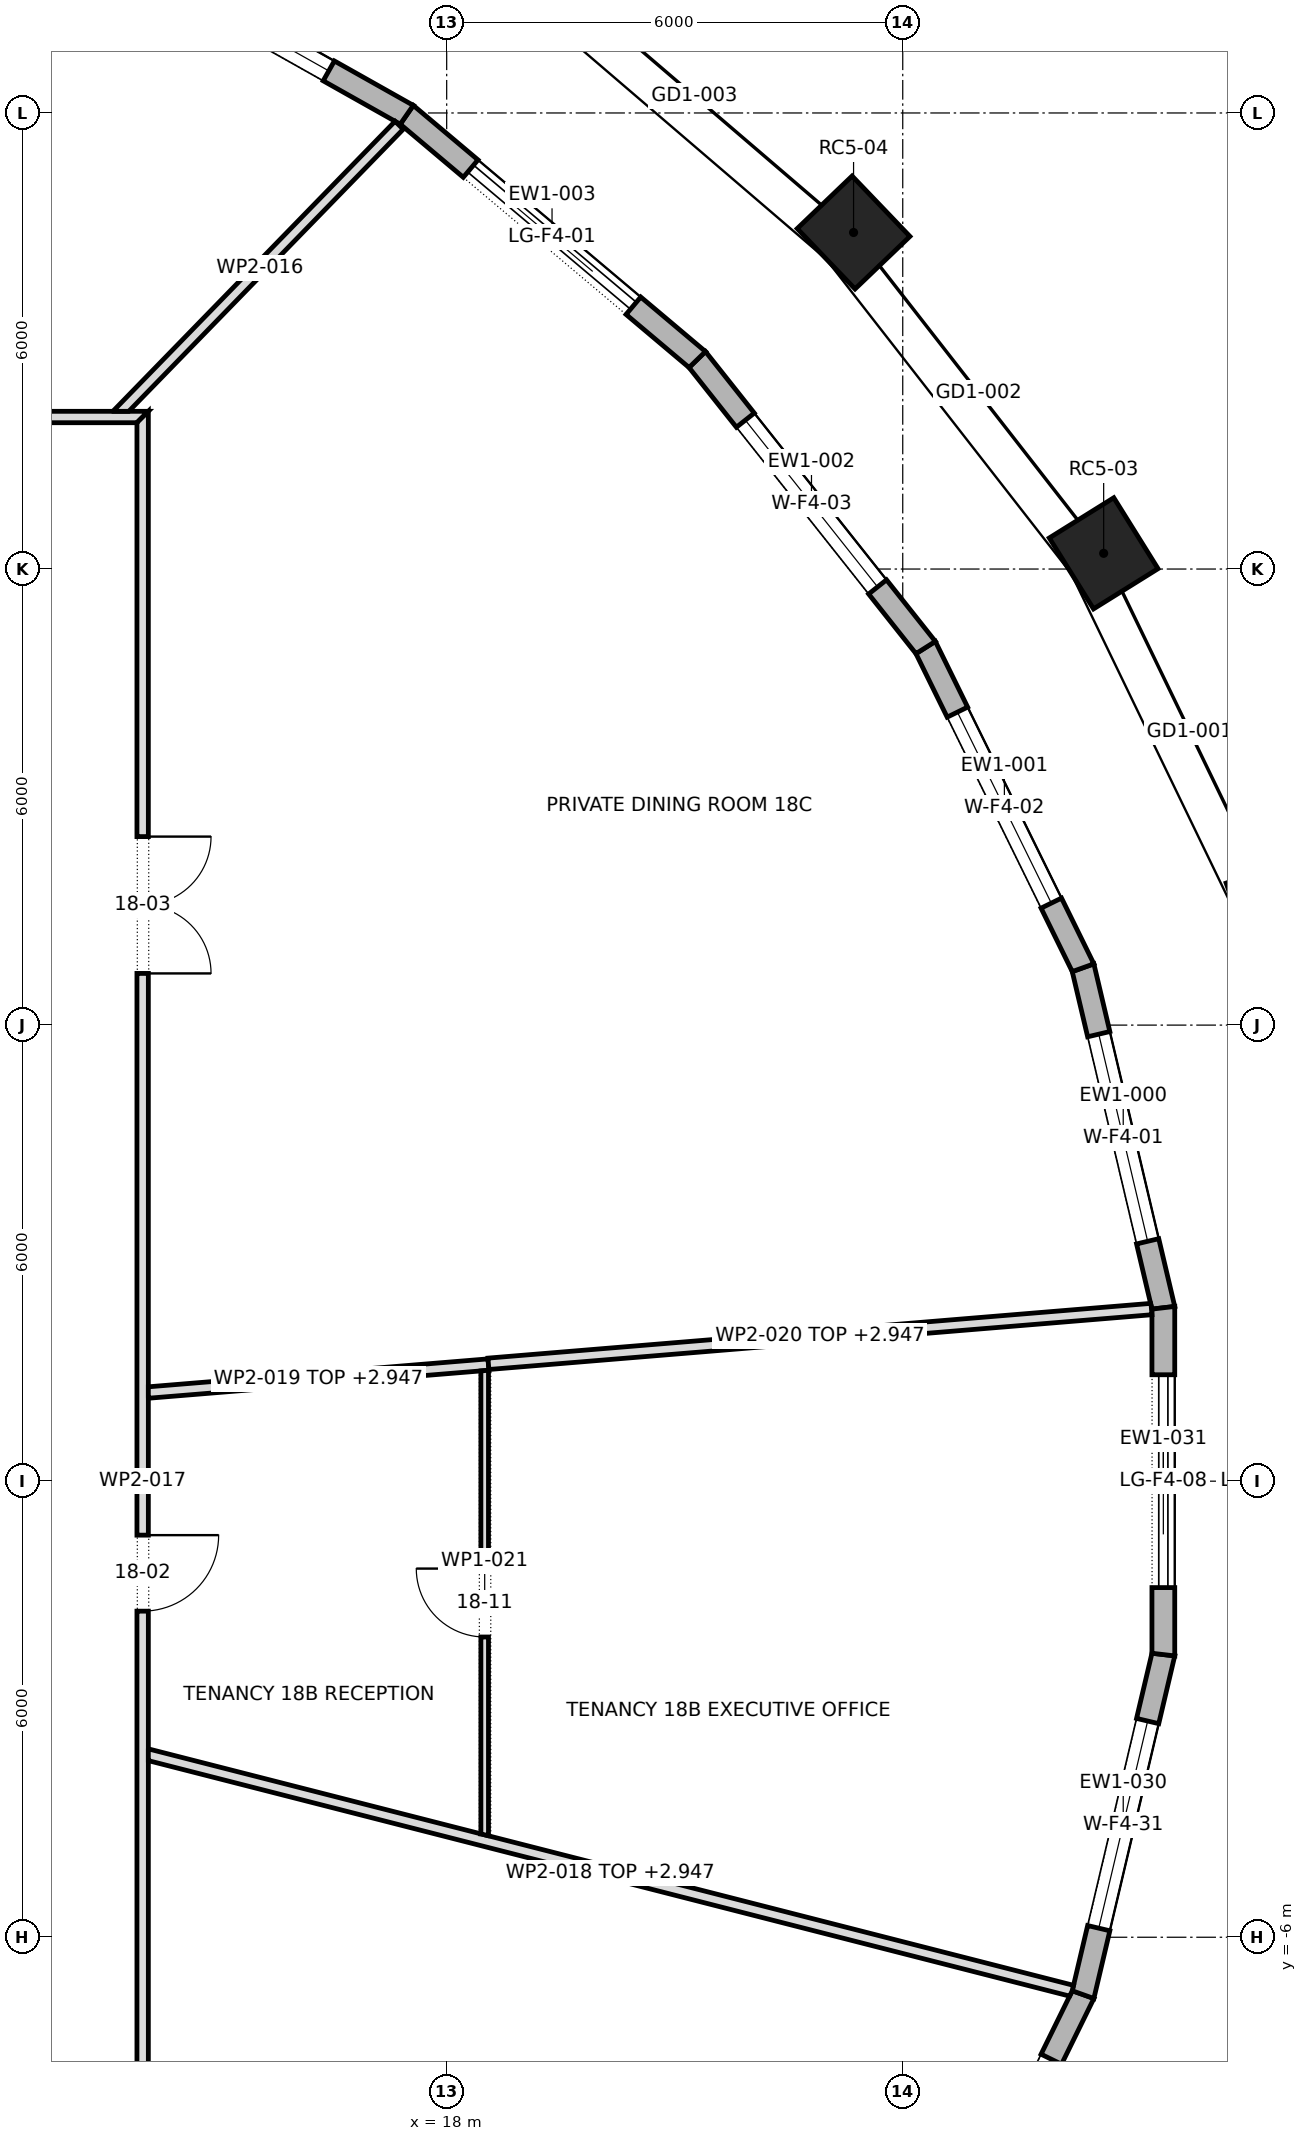
"""IFC4 building model, lengths in metres.
Left out: names, types, materials, properties, quantities, classifications, styles, units other than length and angle.
Written with IfcOpenShell. Run it as: python <this file> out.ifc"""

import sys

from ifc_helpers import new_model, si_unit, direction, frame, frame_2d, origin, origin_2d, place, context, subcontext, project, spatial, polyline, rectangle, outline, extrude, element, fill, save


model = new_model("IFC4")
c1 = context("Model", 3, precision=1e-05, world=origin(), true_north=direction((0.0, 1.0)))
c2 = subcontext(c1, "Body", "Model", "MODEL_VIEW")
j1 = project(units=[si_unit("LENGTHUNIT", "METRE"), si_unit("PLANEANGLEUNIT", "RADIAN")], contexts=[c1])
p1 = place(None, origin())
s1 = spatial("IfcSite", under=j1, at=p1, CompositionType="ELEMENT")
p2 = place(p1, origin())
s2 = spatial("IfcBuilding", under=s1, at=p2, CompositionType="ELEMENT")
p3 = place(p2, frame((0.0, 0.0, 256.3)))
s3 = spatial("IfcBuildingStorey", under=s2, at=p3, CompositionType="ELEMENT", Elevation=256.3)
for number, where, z_axis, x_axis in (
    (1, (28.91, 7.517, 0.0), (0.0, 0.0, 1.0), (-0.334, 0.943, 0.0)),
    (2, (26.643, 12.207, 0.0), (0.0, 0.0, 1.0), (-0.529, 0.849, 0.0)),
    (3, (23.353, 16.427, 0.0), (0.0, 0.0, 1.0), (-0.692, 0.722, 0.0)),
    (4, (28.91, -7.517, 0.0), (0.0, 0.0, 1.0), (0.334, 0.943, 0.0)),
):
    element("IfcColumn", number, at=place(p3, frame(where, z_axis=z_axis, x_axis=x_axis)), inside=s3, PredefinedType="COLUMN", context=c2, shape_type="SweptSolid", body=[
        extrude(rectangle(XDim=1.1, YDim=1.0, at=origin_2d()), origin(), (0.0, 0.0, 1.0), 4.0),
    ])
p4 = place(p3, frame((27.428, 2.281, 0.0), z_axis=(0.0, 0.0, 1.0), x_axis=(-0.229767529411, 0.973245540667, 0.0)))
e5 = element("IfcWall", 5, at=p4, inside=s3, PredefinedType="STANDARD", context=c2, shape_type="SweptSolid", body=[
    extrude(outline(polyline([(-0.018, -0.15), (4.614, -0.15), (4.58, 0.15), (0.018, 0.15), (-0.018, -0.15)])), origin(), (0.0, 0.0, 1.0), 3.7),
])
p5 = place(p4, frame((0.898, 0.0, 0.6)))
e6 = element("IfcOpeningElement", 6, at=p5, cuts=e5, PredefinedType="OPENING", context=c2, shape_type="SweptSolid", body=[
    extrude(rectangle(XDim=2.8, YDim=2.65, at=frame_2d((1.4, 1.325))), frame((0.0, 0.162, 0.0), z_axis=(0.0, -1.0, 0.0), x_axis=(1.0, 0.0, 0.0)), (0.0, 0.0, 1.0), 0.324),
])
p6 = place(p3, frame((26.372, 6.755, 0.0), z_axis=(0.0, 0.0, 1.0), x_axis=(-0.441169971308, 0.89742356578, 0.0)))
e7 = element("IfcWall", 7, at=p6, inside=s3, PredefinedType="STANDARD", context=c2, shape_type="SweptSolid", body=[
    extrude(outline(polyline([(-0.017, -0.15), (4.71, -0.15), (4.678, 0.15), (0.017, 0.15), (-0.017, -0.15)])), origin(), (0.0, 0.0, 1.0), 3.7),
])
p7 = place(p6, frame((0.947, 0.0, 0.6)))
e8 = element("IfcOpeningElement", 8, at=p7, cuts=e7, PredefinedType="OPENING", context=c2, shape_type="SweptSolid", body=[
    extrude(rectangle(XDim=2.8, YDim=2.65, at=frame_2d((1.4, 1.325))), frame((0.0, 0.162, 0.0), z_axis=(0.0, -1.0, 0.0), x_axis=(1.0, 0.0, 0.0)), (0.0, 0.0, 1.0), 0.324),
])
p8 = place(p3, frame((24.302, 10.967, 0.0), z_axis=(0.0, 0.0, 1.0), x_axis=(-0.621358373565, 0.783526497063, 0.0)))
e9 = element("IfcWall", 9, at=p8, inside=s3, PredefinedType="STANDARD", context=c2, shape_type="SweptSolid", body=[
    extrude(outline(polyline([(-0.016, -0.15), (4.851, -0.15), (4.821, 0.15), (0.016, 0.15), (-0.016, -0.15)])), origin(), (0.0, 0.0, 1.0), 3.7),
])
p9 = place(p8, frame((1.018, 0.0, 0.6)))
e10 = element("IfcOpeningElement", 10, at=p9, cuts=e9, PredefinedType="OPENING", context=c2, shape_type="SweptSolid", body=[
    extrude(rectangle(XDim=2.8, YDim=2.65, at=frame_2d((1.4, 1.325))), frame((0.0, 0.162, 0.0), z_axis=(0.0, -1.0, 0.0), x_axis=(1.0, 0.0, 0.0)), (0.0, 0.0, 1.0), 0.324),
])
p10 = place(p3, frame((21.297, 14.756, 0.0), z_axis=(0.0, 0.0, 1.0), x_axis=(-0.764746492461, 0.644331283013, 0.0)))
e11 = element("IfcWall", 11, at=p10, inside=s3, PredefinedType="STANDARD", context=c2, shape_type="SweptSolid", body=[
    extrude(outline(polyline([(-0.015, -0.15), (5.012, -0.15), (4.984, 0.15), (0.015, 0.15), (-0.015, -0.15)])), origin(), (0.0, 0.0, 1.0), 3.7),
])
p11 = place(p10, frame((1.099, 0.0, 0.0)))
e12 = element("IfcOpeningElement", 12, at=p11, cuts=e11, PredefinedType="OPENING", context=c2, shape_type="SweptSolid", body=[
    extrude(rectangle(XDim=2.8, YDim=3.25, at=frame_2d((1.4, 1.625))), frame((0.0, 0.162, 0.0), z_axis=(0.0, -1.0, 0.0), x_axis=(1.0, 0.0, 0.0)), (0.0, 0.0, 1.0), 0.324),
])
p12 = place(p3, frame((17.475, 17.976, 0.0), z_axis=(0.0, 0.0, 1.0), x_axis=(-0.871411047742, 0.490553550465, 0.0)))
e13 = element("IfcWall", 13, at=p12, inside=s3, PredefinedType="STANDARD", context=c2, shape_type="SweptSolid", body=[
    extrude(outline(polyline([(-0.014, -0.15), (5.168, -0.15), (5.141, 0.15), (0.014, 0.15), (-0.014, -0.15)])), origin(), (0.0, 0.0, 1.0), 3.7),
])
p13 = place(p12, frame((1.177, 0.0, 0.6)))
e14 = element("IfcOpeningElement", 14, at=p13, cuts=e13, PredefinedType="OPENING", context=c2, shape_type="SweptSolid", body=[
    extrude(rectangle(XDim=2.8, YDim=2.65, at=frame_2d((1.4, 1.325))), frame((0.0, 0.162, 0.0), z_axis=(0.0, -1.0, 0.0), x_axis=(1.0, 0.0, 0.0)), (0.0, 0.0, 1.0), 0.324),
])
p14 = place(p3, frame((24.302, -10.967, 0.0), z_axis=(0.0, 0.0, 1.0), x_axis=(0.441169971308, 0.89742356578, 0.0)))
e15 = element("IfcWall", 15, at=p14, inside=s3, PredefinedType="STANDARD", context=c2, shape_type="SweptSolid", body=[
    extrude(outline(polyline([(-0.016, -0.15), (4.711, -0.15), (4.677, 0.15), (0.016, 0.15), (-0.016, -0.15)])), origin(), (0.0, 0.0, 1.0), 3.7),
])
p15 = place(p14, frame((0.947, 0.0, 0.6)))
e16 = element("IfcOpeningElement", 16, at=p15, cuts=e15, PredefinedType="OPENING", context=c2, shape_type="SweptSolid", body=[
    extrude(rectangle(XDim=2.8, YDim=2.65, at=frame_2d((1.4, 1.325))), frame((0.0, 0.162, 0.0), z_axis=(0.0, -1.0, 0.0), x_axis=(1.0, 0.0, 0.0)), (0.0, 0.0, 1.0), 0.324),
])
p16 = place(p3, frame((26.372, -6.755, 0.0), z_axis=(0.0, 0.0, 1.0), x_axis=(0.229767529411, 0.973245540667, 0.0)))
e17 = element("IfcWall", 17, at=p16, inside=s3, PredefinedType="STANDARD", context=c2, shape_type="SweptSolid", body=[
    extrude(outline(polyline([(-0.017, -0.15), (4.614, -0.15), (4.579, 0.15), (0.017, 0.15), (-0.017, -0.15)])), origin(), (0.0, 0.0, 1.0), 3.7),
])
p17 = place(p16, frame((0.898, 0.0, 0.6)))
e18 = element("IfcOpeningElement", 18, at=p17, cuts=e17, PredefinedType="OPENING", context=c2, shape_type="SweptSolid", body=[
    extrude(rectangle(XDim=2.8, YDim=2.65, at=frame_2d((1.4, 1.325))), frame((0.0, 0.162, 0.0), z_axis=(0.0, -1.0, 0.0), x_axis=(1.0, 0.0, 0.0)), (0.0, 0.0, 1.0), 0.324),
])
p18 = place(p3, frame((27.428, -2.281, 0.0), z_axis=(0.0, 0.0, 1.0), x_axis=(0.0, 1.0, 0.0)))
e19 = element("IfcWall", 19, at=p18, inside=s3, PredefinedType="STANDARD", context=c2, shape_type="SweptSolid", body=[
    extrude(outline(polyline([(-0.018, -0.15), (4.58, -0.15), (4.545, 0.15), (0.018, 0.15), (-0.018, -0.15)])), origin(), (0.0, 0.0, 1.0), 3.7),
])
p19 = place(p18, frame((0.881, 0.0, 0.0)))
e20 = element("IfcOpeningElement", 20, at=p19, cuts=e19, PredefinedType="OPENING", context=c2, shape_type="SweptSolid", body=[
    extrude(rectangle(XDim=2.8, YDim=3.25, at=frame_2d((1.4, 1.625))), frame((0.0, 0.162, 0.0), z_axis=(0.0, -1.0, 0.0), x_axis=(1.0, 0.0, 0.0)), (0.0, 0.0, 1.0), 0.324),
])
p20 = place(p3, frame((-14.075, 14.0, 0.0), z_axis=(0.0, 0.0, 1.0), x_axis=(1.0, 0.0, 0.0)))
e21 = element("IfcWall", 21, at=p20, inside=s3, PredefinedType="PARTITIONING", context=c2, shape_type="SweptSolid", body=[
    extrude(outline(polyline([(0.15, -0.075), (2.139, -0.075), (4.128, -0.075), (6.118, -0.075), (8.107, -0.075), (10.096, -0.075), (12.086, -0.075), (14.075, -0.075), (16.064, -0.075), (18.053, -0.075), (20.043, -0.075), (22.032, -0.075), (24.021, -0.075), (26.011, -0.075), (28.0, -0.075), (28.15, 0.075), (26.273, 0.075), (24.396, 0.075), (22.52, 0.075), (20.643, 0.075), (18.767, 0.075), (16.89, 0.075), (15.013, 0.075), (13.137, 0.075), (11.26, 0.075), (9.383, 0.075), (7.507, 0.075), (5.63, 0.075), (3.753, 0.075), (1.877, 0.075), (0.0, 0.075), (0.15, -0.075)])), origin(), (0.0, 0.0, 1.0), 3.7),
])
p21 = place(p20, frame((22.915, 0.0, 0.0)))
e22 = element("IfcOpeningElement", 22, at=p21, cuts=e21, PredefinedType="OPENING", context=c2, shape_type="SweptSolid", body=[
    extrude(rectangle(XDim=1.0, YDim=2.1, at=frame_2d((0.5, 1.05))), frame((0.0, 0.087, 0.0), z_axis=(0.0, -1.0, 0.0), x_axis=(1.0, 0.0, 0.0)), (0.0, 0.0, 1.0), 0.174),
])
p22 = place(p20, frame((15.275, 0.0, 0.0)))
e23 = element("IfcOpeningElement", 23, at=p22, cuts=e21, PredefinedType="OPENING", context=c2, shape_type="SweptSolid", body=[
    extrude(rectangle(XDim=1.0, YDim=2.1, at=frame_2d((0.5, 1.05))), frame((0.0, 0.087, 0.0), z_axis=(0.0, -1.0, 0.0), x_axis=(1.0, 0.0, 0.0)), (0.0, 0.0, 1.0), 0.174),
])
p23 = place(p20, frame((5.355, 0.0, 0.0)))
e24 = element("IfcOpeningElement", 24, at=p23, cuts=e21, PredefinedType="OPENING", context=c2, shape_type="SweptSolid", body=[
    extrude(rectangle(XDim=1.8, YDim=2.1, at=frame_2d((0.9, 1.05))), frame((0.0, 0.087, 0.0), z_axis=(0.0, -1.0, 0.0), x_axis=(1.0, 0.0, 0.0)), (0.0, 0.0, 1.0), 0.174),
])
p24 = place(p3, frame((13.662, 14.023, 0.0), z_axis=(0.0, 0.0, 1.0), x_axis=(0.697340314613, 0.716740179992, 0.0)))
e25 = element("IfcWall", 25, at=p24, inside=s3, PredefinedType="PARTITIONING", context=c2, shape_type="SweptSolid", body=[
    extrude(outline(polyline([(0.0, 0.075), (0.0, 0.075), (0.146, -0.075), (1.871, -0.075), (3.597, -0.075), (5.323, -0.075), (5.323, 0.075), (3.549, 0.075), (1.774, 0.075), (0.0, 0.075)])), origin(), (0.0, 0.0, 1.0), 3.7),
])
p25 = place(p3, frame((14.0, -14.075, 0.0), z_axis=(0.0, 0.0, 1.0), x_axis=(0.0, 1.0, 0.0)))
e26 = element("IfcWall", 26, at=p25, inside=s3, PredefinedType="PARTITIONING", context=c2, shape_type="SweptSolid", body=[
    extrude(outline(polyline([(0.0, -0.075), (1.877, -0.075), (3.753, -0.075), (5.63, -0.075), (7.507, -0.075), (9.383, -0.075), (11.26, -0.075), (13.137, -0.075), (15.013, -0.075), (16.89, -0.075), (18.767, -0.075), (20.643, -0.075), (22.52, -0.075), (24.396, -0.075), (26.273, -0.075), (28.15, -0.075), (28.0, 0.075), (26.011, 0.075), (24.021, 0.075), (22.032, 0.075), (20.043, 0.075), (18.053, 0.075), (16.064, 0.075), (14.075, 0.075), (12.086, 0.075), (10.096, 0.075), (8.107, 0.075), (6.118, 0.075), (4.128, 0.075), (2.139, 0.075), (0.15, 0.075), (0.0, -0.075)])), origin(), (0.0, 0.0, 1.0), 3.7),
])
p26 = place(p25, frame((12.365, 0.0, 0.0)))
e27 = element("IfcOpeningElement", 27, at=p26, cuts=e26, PredefinedType="OPENING", context=c2, shape_type="SweptSolid", body=[
    extrude(rectangle(XDim=1.0, YDim=2.1, at=frame_2d((0.5, 1.05))), frame((0.0, 0.087, 0.0), z_axis=(0.0, -1.0, 0.0), x_axis=(1.0, 0.0, 0.0)), (0.0, 0.0, 1.0), 0.174),
])
p27 = place(p25, frame((20.755, 0.0, 0.0)))
e28 = element("IfcOpeningElement", 28, at=p27, cuts=e26, PredefinedType="OPENING", context=c2, shape_type="SweptSolid", body=[
    extrude(rectangle(XDim=1.8, YDim=2.1, at=frame_2d((0.9, 1.05))), frame((0.0, 0.087, 0.0), z_axis=(0.0, -1.0, 0.0), x_axis=(1.0, 0.0, 0.0)), (0.0, 0.0, 1.0), 0.174),
])
p28 = place(p3, frame((14.057, -3.594, 0.0), z_axis=(0.0, 0.0, 1.0), x_axis=(0.968853358083, -0.24763515609, 0.0)))
e29 = element("IfcWall", 29, at=p28, inside=s3, PredefinedType="PARTITIONING", context=c2, shape_type="SweptSolid", body=[
    extrude(outline(polyline([(0.038, -0.075), (1.825, -0.075), (3.613, -0.075), (5.4, -0.075), (7.187, -0.075), (8.974, -0.075), (10.761, -0.075), (12.548, -0.075), (12.563, -0.004), (12.563, 0.066), (12.563, 0.075), (10.768, 0.075), (8.974, 0.075), (7.179, 0.075), (5.384, 0.075), (3.589, 0.075), (1.795, 0.075), (0.0, 0.075), (0.0, 0.074), (0.038, -0.075)])), origin(), (0.0, 0.0, 1.0), 2.947),
])
p29 = place(p3, frame((14.069, 1.166, 0.0), z_axis=(0.0, 0.0, 1.0), x_axis=(0.996636539938, 0.081948808782, 0.0)))
e30 = element("IfcWall", 30, at=p29, inside=s3, PredefinedType="PARTITIONING", context=c2, shape_type="SweptSolid", body=[
    extrude(outline(polyline([(4.496, -0.075), (4.496, -0.003), (4.496, 0.075), (3.001, 0.075), (1.506, 0.075), (0.012, 0.075), (0.0, -0.069), (0.0, -0.075), (1.499, -0.075), (2.997, -0.075), (4.496, -0.075)])), origin(), (0.0, 0.0, 1.0), 2.947),
])
p30 = place(p3, frame((18.549, 1.544, 0.0), z_axis=(0.0, 0.0, 1.0), x_axis=(0.996604371019, 0.082339101686, 0.0)))
e31 = element("IfcWall", 31, at=p30, inside=s3, PredefinedType="PARTITIONING", context=c2, shape_type="SweptSolid", body=[
    extrude(outline(polyline([(8.753, -0.075), (8.753, 0.039), (8.748, 0.075), (6.998, 0.075), (5.249, 0.075), (3.499, 0.075), (1.75, 0.075), (0.0, 0.075), (0.0, -0.075), (1.75, -0.075), (3.501, -0.075), (5.252, -0.075), (7.002, -0.075), (8.753, -0.075)])), origin(), (0.0, 0.0, 1.0), 2.947),
])
p31 = place(p3, frame((18.5, 1.458, 0.0), z_axis=(0.0, 0.0, 1.0), x_axis=(0.0, -1.0, 0.0)))
e32 = element("IfcWall", 32, at=p31, inside=s3, PredefinedType="PARTITIONING", context=c2, shape_type="SweptSolid", body=[
    extrude(outline(polyline([(0.008, -0.05), (1.531, -0.05), (3.053, -0.05), (4.576, -0.05), (6.098, -0.05), (6.124, 0.05), (6.124, 0.05), (4.593, 0.05), (3.062, 0.05), (1.531, 0.05), (0.0, 0.05), (0.0, 0.046), (0.008, -0.05)])), origin(), (0.0, 0.0, 1.0), 3.7),
])
p32 = place(p31, frame((2.608, 0.0, 0.0)))
e33 = element("IfcOpeningElement", 33, at=p32, cuts=e32, PredefinedType="OPENING", context=c2, shape_type="SweptSolid", body=[
    extrude(rectangle(XDim=0.9, YDim=2.1, at=frame_2d((0.45, 1.05))), frame((0.0, 0.062, 0.0), z_axis=(0.0, -1.0, 0.0), x_axis=(1.0, 0.0, 0.0)), (0.0, 0.0, 1.0), 0.124),
])
p33 = place(p5, origin())
e34 = element("IfcWindow", 34, at=p33, inside=s3, PartitioningType="DOUBLE_PANEL_VERTICAL", PredefinedType="WINDOW", context=c2, shape_type="SweptSolid", body=[
    extrude(rectangle(XDim=2.8, YDim=2.65, at=frame_2d((1.4, 1.325))), frame((0.0, 0.03, 0.0), z_axis=(0.0, -1.0, 0.0), x_axis=(1.0, 0.0, 0.0)), (0.0, 0.0, 1.0), 0.06),
])
fill(e6, e34)
p34 = place(p7, origin())
e35 = element("IfcWindow", 35, at=p34, inside=s3, PartitioningType="DOUBLE_PANEL_VERTICAL", PredefinedType="WINDOW", context=c2, shape_type="SweptSolid", body=[
    extrude(rectangle(XDim=2.8, YDim=2.65, at=frame_2d((1.4, 1.325))), frame((0.0, 0.03, 0.0), z_axis=(0.0, -1.0, 0.0), x_axis=(1.0, 0.0, 0.0)), (0.0, 0.0, 1.0), 0.06),
])
fill(e8, e35)
p35 = place(p9, origin())
e36 = element("IfcWindow", 36, at=p35, inside=s3, PartitioningType="DOUBLE_PANEL_VERTICAL", PredefinedType="WINDOW", context=c2, shape_type="SweptSolid", body=[
    extrude(rectangle(XDim=2.8, YDim=2.65, at=frame_2d((1.4, 1.325))), frame((0.0, 0.03, 0.0), z_axis=(0.0, -1.0, 0.0), x_axis=(1.0, 0.0, 0.0)), (0.0, 0.0, 1.0), 0.06),
])
fill(e10, e36)
p36 = place(p11, origin())
e37 = element("IfcDoor", 37, at=p36, inside=s3, OperationType="DOUBLE_DOOR_SLIDING", PredefinedType="DOOR", context=c2, shape_type="SweptSolid", body=[
    extrude(rectangle(XDim=2.8, YDim=3.25, at=frame_2d((1.4, 1.625))), frame((0.0, 0.025, 0.0), z_axis=(0.0, -1.0, 0.0), x_axis=(1.0, 0.0, 0.0)), (0.0, 0.0, 1.0), 0.05),
])
fill(e12, e37)
p37 = place(p13, origin())
e38 = element("IfcWindow", 38, at=p37, inside=s3, PartitioningType="DOUBLE_PANEL_VERTICAL", PredefinedType="WINDOW", context=c2, shape_type="SweptSolid", body=[
    extrude(rectangle(XDim=2.8, YDim=2.65, at=frame_2d((1.4, 1.325))), frame((0.0, 0.03, 0.0), z_axis=(0.0, -1.0, 0.0), x_axis=(1.0, 0.0, 0.0)), (0.0, 0.0, 1.0), 0.06),
])
fill(e14, e38)
p38 = place(p15, origin())
e39 = element("IfcWindow", 39, at=p38, inside=s3, PartitioningType="DOUBLE_PANEL_VERTICAL", PredefinedType="WINDOW", context=c2, shape_type="SweptSolid", body=[
    extrude(rectangle(XDim=2.8, YDim=2.65, at=frame_2d((1.4, 1.325))), frame((0.0, 0.03, 0.0), z_axis=(0.0, -1.0, 0.0), x_axis=(1.0, 0.0, 0.0)), (0.0, 0.0, 1.0), 0.06),
])
fill(e16, e39)
p39 = place(p17, origin())
e40 = element("IfcWindow", 40, at=p39, inside=s3, PartitioningType="DOUBLE_PANEL_VERTICAL", PredefinedType="WINDOW", context=c2, shape_type="SweptSolid", body=[
    extrude(rectangle(XDim=2.8, YDim=2.65, at=frame_2d((1.4, 1.325))), frame((0.0, 0.03, 0.0), z_axis=(0.0, -1.0, 0.0), x_axis=(1.0, 0.0, 0.0)), (0.0, 0.0, 1.0), 0.06),
])
fill(e18, e40)
p40 = place(p19, origin())
e41 = element("IfcDoor", 41, at=p40, inside=s3, OperationType="DOUBLE_DOOR_SLIDING", PredefinedType="DOOR", context=c2, shape_type="SweptSolid", body=[
    extrude(rectangle(XDim=2.8, YDim=3.25, at=frame_2d((1.4, 1.625))), frame((0.0, 0.025, 0.0), z_axis=(0.0, -1.0, 0.0), x_axis=(1.0, 0.0, 0.0)), (0.0, 0.0, 1.0), 0.05),
])
fill(e20, e41)
p41 = place(p26, frame((1.0, 0.0, 0.0), z_axis=(0.0, 0.0, 1.0), x_axis=(-1.0, 0.0, 0.0)))
e42 = element("IfcDoor", 42, at=p41, inside=s3, OperationType="SINGLE_SWING_RIGHT", PredefinedType="DOOR", context=c2, shape_type="SweptSolid", body=[
    extrude(rectangle(XDim=1.0, YDim=2.1, at=frame_2d((0.5, 1.05))), frame((0.0, 0.025, 0.0), z_axis=(0.0, -1.0, 0.0), x_axis=(1.0, 0.0, 0.0)), (0.0, 0.0, 1.0), 0.05),
])
fill(e27, e42)
p42 = place(p27, frame((1.8, 0.0, 0.0), z_axis=(0.0, 0.0, 1.0), x_axis=(-1.0, 0.0, 0.0)))
e43 = element("IfcDoor", 43, at=p42, inside=s3, OperationType="DOUBLE_DOOR_SINGLE_SWING", PredefinedType="DOOR", context=c2, shape_type="SweptSolid", body=[
    extrude(rectangle(XDim=1.8, YDim=2.1, at=frame_2d((0.9, 1.05))), frame((0.0, 0.025, 0.0), z_axis=(0.0, -1.0, 0.0), x_axis=(1.0, 0.0, 0.0)), (0.0, 0.0, 1.0), 0.05),
])
fill(e28, e43)
p43 = place(p32, frame((0.9, 0.0, 0.0), z_axis=(0.0, 0.0, 1.0), x_axis=(-1.0, 0.0, 0.0)))
e44 = element("IfcDoor", 44, at=p43, inside=s3, OperationType="SINGLE_SWING_LEFT", PredefinedType="DOOR", context=c2, shape_type="SweptSolid", body=[
    extrude(rectangle(XDim=0.9, YDim=2.1, at=frame_2d((0.45, 1.05))), frame((0.0, 0.025, 0.0), z_axis=(0.0, -1.0, 0.0), x_axis=(1.0, 0.0, 0.0)), (0.0, 0.0, 1.0), 0.05),
])
fill(e33, e44)
save(model, sys.argv[1])
